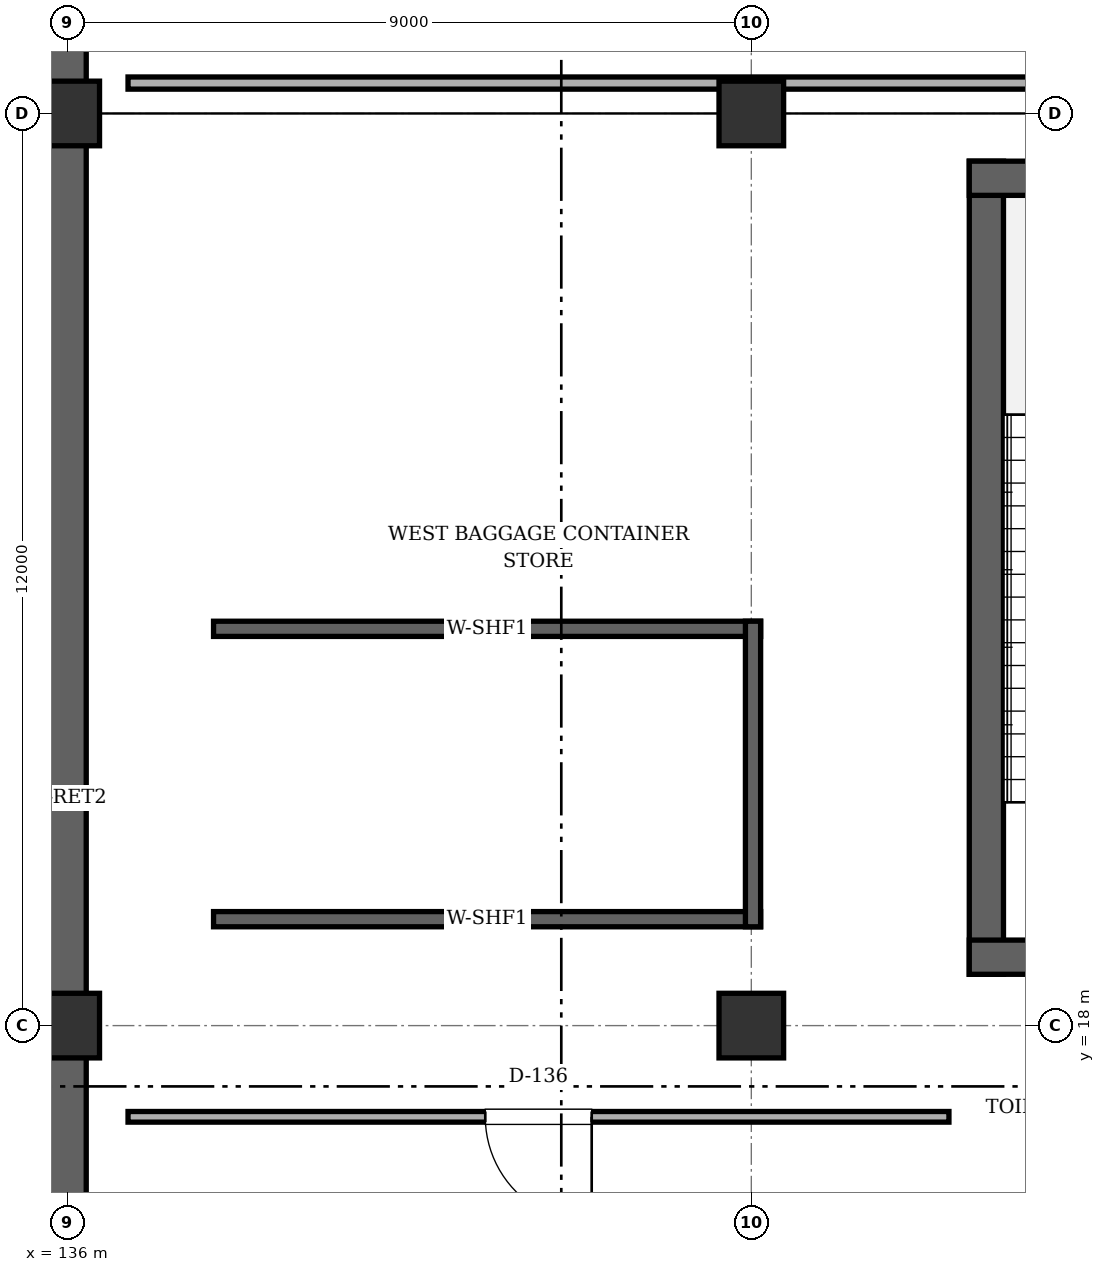
"""IFC4 building model, lengths in metres.
Left out: names, types, materials, properties, quantities, classifications, styles, units other than length and angle.
Written with IfcOpenShell. Run it as: python <this file> out.ifc"""

import sys

from ifc_helpers import new_model, si_unit, direction, frame, frame_2d, origin, origin_2d, place, context, subcontext, project, spatial, rectangle, extrude, element, fill, save


model = new_model("IFC4")
c1 = context("Model", 3, precision=1e-05, world=origin(), true_north=direction((0.0, 1.0)))
c2 = subcontext(c1, "Body", "Model", "MODEL_VIEW")
j1 = project(units=[si_unit("LENGTHUNIT", "METRE"), si_unit("PLANEANGLEUNIT", "RADIAN")], contexts=[c1])
p1 = place(None, origin())
s1 = spatial("IfcSite", under=j1, at=p1, CompositionType="ELEMENT")
p2 = place(p1, origin())
s2 = spatial("IfcBuilding", under=s1, at=p2, CompositionType="ELEMENT")
p3 = place(p2, frame((0.0, 0.0, -5.4)))
s3 = spatial("IfcBuildingStorey", under=s2, at=p3, CompositionType="ELEMENT", Elevation=-5.4)
for number, where, z_axis, x_axis in (
    (1, (136.0, 18.0, 0.0), (0.0, 0.0, 1.0), (1.0, 0.0, 0.0)),
    (2, (136.0, 30.0, 0.0), (0.0, 0.0, 1.0), (1.0, 0.0, 0.0)),
    (3, (145.0, 18.0, 0.0), (0.0, 0.0, 1.0), (1.0, 0.0, 0.0)),
    (4, (145.0, 30.0, 0.0), (0.0, 0.0, 1.0), (1.0, 0.0, 0.0)),
):
    element("IfcColumn", number, at=place(p3, frame(where, z_axis=z_axis, x_axis=x_axis)), inside=s3, PredefinedType="COLUMN", context=c2, shape_type="SweptSolid", body=[
        extrude(rectangle(XDim=0.85, YDim=0.85, at=origin_2d()), origin(), (0.0, 0.0, 1.0), 5.4),
    ])
p4 = place(p3, frame((136.0, 42.0, 0.0), z_axis=(0.0, 0.0, 1.0), x_axis=(0.0, -1.0, 0.0)))
e5 = element("IfcWall", 5, at=p4, inside=s3, PredefinedType="USERDEFINED", context=c2, shape_type="SweptSolid", body=[
    extrude(rectangle(XDim=42.0, YDim=0.5, at=frame_2d((21.0, 0.0))), origin(), (0.0, 0.0, 1.0), 5.1),
])
p5 = place(p3, frame((148.093, 29.373, 0.0), z_axis=(0.0, 0.0, 1.0), x_axis=(0.0, -1.0, 0.0)))
e6 = element("IfcWall", 6, at=p5, inside=s3, PredefinedType="SHEAR", context=c2, shape_type="SweptSolid", body=[
    extrude(rectangle(XDim=10.698, YDim=0.45, at=frame_2d((5.349, 0.0))), origin(), (0.0, 0.0, 1.0), 5.1),
])
p6 = place(p3, frame((152.387, 29.147, 0.0), z_axis=(0.0, 0.0, 1.0), x_axis=(-1.0, 0.0, 0.0)))
e7 = element("IfcWall", 7, at=p6, inside=s3, PredefinedType="SHEAR", context=c2, shape_type="SweptSolid", body=[
    extrude(rectangle(XDim=4.52, YDim=0.45, at=frame_2d((2.26, 0.0))), origin(), (0.0, 0.0, 1.0), 5.1),
])
p7 = place(p3, frame((147.867, 18.9, 0.0), z_axis=(0.0, 0.0, 1.0), x_axis=(1.0, 0.0, 0.0)))
e8 = element("IfcWall", 8, at=p7, inside=s3, PredefinedType="SHEAR", context=c2, shape_type="SweptSolid", body=[
    extrude(rectangle(XDim=4.52, YDim=0.45, at=frame_2d((2.26, 0.0))), origin(), (0.0, 0.0, 1.0), 5.1),
])
p8 = place(p7, frame((0.95, 0.0, 0.0)))
e9 = element("IfcOpeningElement", 9, at=p8, cuts=e8, PredefinedType="OPENING", context=c2, shape_type="SweptSolid", body=[
    extrude(rectangle(XDim=1.3, YDim=2.1, at=frame_2d((0.65, 1.05))), frame((0.0, 0.235, 0.0), z_axis=(0.0, -1.0, 0.0), x_axis=(1.0, 0.0, 0.0)), (0.0, 0.0, 1.0), 0.47),
])
for number, where, z_axis, x_axis in (
    (10, (137.925, 19.4, 0.0), (0.0, 0.0, 1.0), (1.0, 0.0, 0.0)),
    (11, (145.123, 23.22, 0.0), (0.0, 0.0, 1.0), (-1.0, 0.0, 0.0)),
):
    element("IfcWall", number, at=place(p3, frame(where, z_axis=z_axis, x_axis=x_axis)), inside=s3, PredefinedType="SOLIDWALL", context=c2, shape_type="SweptSolid", body=[
        extrude(rectangle(XDim=7.198, YDim=0.2, at=frame_2d((3.599, 0.0))), origin(), (0.0, 0.0, 1.0), 5.1),
    ])
p9 = place(p3, frame((145.022, 19.3, 0.0), z_axis=(0.0, 0.0, 1.0), x_axis=(0.0, 1.0, 0.0)))
e12 = element("IfcWall", 12, at=p9, inside=s3, PredefinedType="SOLIDWALL", context=c2, shape_type="SweptSolid", body=[
    extrude(rectangle(XDim=4.02, YDim=0.2, at=frame_2d((2.01, 0.0))), origin(), (0.0, 0.0, 1.0), 5.1),
])
p10 = place(p3, frame((163.2, 30.4, 0.0), z_axis=(0.0, 0.0, 1.0), x_axis=(-1.0, 0.0, 0.0)))
e13 = element("IfcWall", 13, at=p10, inside=s3, PredefinedType="PARTITIONING", context=c2, shape_type="SweptSolid", body=[
    extrude(rectangle(XDim=26.4, YDim=0.16, at=frame_2d((13.2, 0.0))), origin(), (0.0, 0.0, 1.0), 4.4),
])
p11 = place(p3, frame((147.6, 16.8, 0.0), z_axis=(0.0, 0.0, 1.0), x_axis=(-1.0, 0.0, 0.0)))
e14 = element("IfcWall", 14, at=p11, inside=s3, PredefinedType="PARTITIONING", context=c2, shape_type="SweptSolid", body=[
    extrude(rectangle(XDim=10.8, YDim=0.14, at=frame_2d((5.4, 0.0))), origin(), (0.0, 0.0, 1.0), 4.4),
])
p12 = place(p11, frame((4.7, 0.0, 0.0)))
e15 = element("IfcOpeningElement", 15, at=p12, cuts=e14, PredefinedType="OPENING", context=c2, shape_type="SweptSolid", body=[
    extrude(rectangle(XDim=1.4, YDim=2.1, at=frame_2d((0.7, 1.05))), frame((0.0, 0.08, 0.0), z_axis=(0.0, -1.0, 0.0), x_axis=(1.0, 0.0, 0.0)), (0.0, 0.0, 1.0), 0.16),
])
p13 = place(p12, origin())
e16 = element("IfcDoor", 16, at=p13, inside=s3, OperationType="SINGLE_SWING_LEFT", PredefinedType="DOOR", context=c2, shape_type="SweptSolid", body=[
    extrude(rectangle(XDim=1.4, YDim=2.1, at=frame_2d((0.7, 1.05))), frame((0.0, 0.025, 0.0), z_axis=(0.0, -1.0, 0.0), x_axis=(1.0, 0.0, 0.0)), (0.0, 0.0, 1.0), 0.05),
])
fill(e15, e16)
save(model, sys.argv[1])
